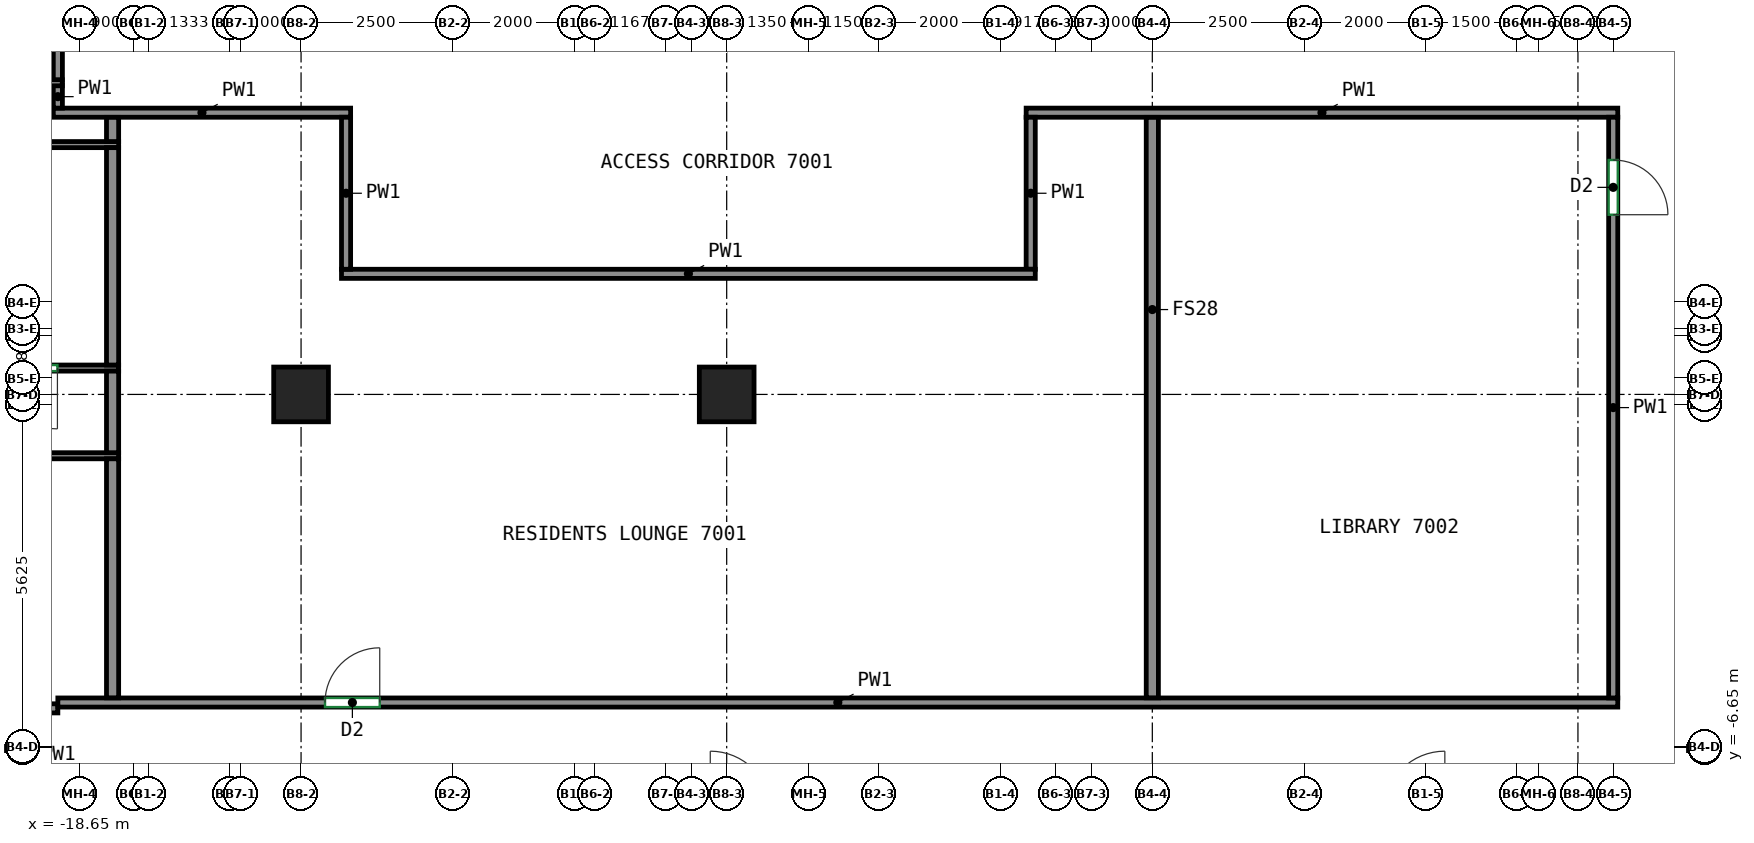
"""IFC4 building model, lengths in metres.
Left out: names, types, materials, properties, quantities, classifications, styles, units other than length and angle.
Written with IfcOpenShell. Run it as: python <this file> out.ifc"""

import sys

from ifc_helpers import new_model, si_unit, direction, frame, frame_2d, origin, origin_2d, place, context, subcontext, project, spatial, rectangle, extrude, source, transform, mapped, element, fill, save


model = new_model("IFC4")
c1 = context("Model", 3, precision=1e-05, world=origin(), true_north=direction((0.0, 1.0)))
c2 = subcontext(c1, "Body", "Model", "MODEL_VIEW")
j1 = project(units=[si_unit("LENGTHUNIT", "METRE"), si_unit("PLANEANGLEUNIT", "RADIAN")], contexts=[c1])
p1 = place(None, origin())
s1 = spatial("IfcSite", under=j1, at=p1, CompositionType="ELEMENT")
p2 = place(p1, origin())
s2 = spatial("IfcBuilding", under=s1, at=p2, CompositionType="ELEMENT")
p3 = place(p2, frame((0.0, 0.0, 284.0)))
s3 = spatial("IfcBuildingStorey", under=s2, at=p3, CompositionType="ELEMENT", Elevation=284.0)
m1 = source(origin(), c2, "Body", "SweptSolid", [
    extrude(rectangle(XDim=0.9, YDim=0.9, at=origin_2d()), origin(), (0.0, 0.0, 1.0), 3.12),
])
for number, where, z_axis, x_axis in (
    (1, (-15.0, -0.833, 0.0), (0.0, 0.0, 1.0), (1.0, 0.0, 0.0)),
    (2, (-8.0, -0.833, 0.0), (0.0, 0.0, 1.0), (1.0, 0.0, 0.0)),
):
    element("IfcColumn", number, at=place(p3, frame(where, z_axis=z_axis, x_axis=x_axis)), inside=s3, PredefinedType="COLUMN", context=c2, shape_type="MappedRepresentation", body=[
        mapped(m1, transform((0.0, 0.0, 0.0))),
    ])
p4 = place(p3, frame((-19.0, -5.996, 0.0), z_axis=(0.0, 0.0, 1.0), x_axis=(-1.0, 0.0, 0.0)))
e3 = element("IfcWall", 3, at=p4, inside=s3, PredefinedType="PARTITIONING", context=c2, shape_type="SweptSolid", body=[
    extrude(rectangle(XDim=0.677, YDim=0.15, at=frame_2d((0.338, 0.0))), origin(), (0.0, 0.0, 1.0), 3.12),
])
p5 = place(p3, frame((-19.0, -5.9, 0.0), z_axis=(0.0, 0.0, 1.0), x_axis=(1.0, 0.0, 0.0)))
e4 = element("IfcWall", 4, at=p5, inside=s3, PredefinedType="PARTITIONING", context=c2, shape_type="SweptSolid", body=[
    extrude(rectangle(XDim=25.655, YDim=0.15, at=frame_2d((12.828, 0.0))), origin(), (0.0, 0.0, 1.0), 3.12),
])
p6 = place(p5, frame((4.394, 0.0, 0.0)))
e5 = element("IfcOpeningElement", 5, at=p6, cuts=e4, PredefinedType="OPENING", context=c2, shape_type="SweptSolid", body=[
    extrude(rectangle(XDim=0.9, YDim=2.1, at=frame_2d((0.45, 1.05))), frame((0.0, 0.085, 0.0), z_axis=(0.0, -1.0, 0.0), x_axis=(1.0, 0.0, 0.0)), (0.0, 0.0, 1.0), 0.17),
])
p7 = place(p3, frame((-19.075, 3.8, 0.0), z_axis=(0.0, 0.0, 1.0), x_axis=(1.0, 0.0, 0.0)))
e6 = element("IfcWall", 6, at=p7, inside=s3, PredefinedType="PARTITIONING", context=c2, shape_type="SweptSolid", body=[
    extrude(rectangle(XDim=4.89, YDim=0.15, at=frame_2d((2.445, 0.0))), origin(), (0.0, 0.0, 1.0), 3.12),
])
p8 = place(p3, frame((-19.0, 3.875, 0.0), z_axis=(0.0, 0.0, 1.0), x_axis=(0.0, 1.0, 0.0)))
e7 = element("IfcWall", 7, at=p8, inside=s3, PredefinedType="PARTITIONING", context=c2, shape_type="SweptSolid", body=[
    extrude(rectangle(XDim=0.377, YDim=0.15, at=frame_2d((0.188, 0.0))), origin(), (0.0, 0.0, 1.0), 3.12),
])
p9 = place(p3, frame((-19.0, 4.332, 0.0), z_axis=(0.0, 0.0, 1.0), x_axis=(0.0, 1.0, 0.0)))
e8 = element("IfcWall", 8, at=p9, inside=s3, PredefinedType="PARTITIONING", context=c2, shape_type="SweptSolid", body=[
    extrude(rectangle(XDim=3.578, YDim=0.15, at=frame_2d((1.789, 0.0))), origin(), (0.0, 0.0, 1.0), 3.12),
])
p10 = place(p3, frame((-3.075, 3.8, 0.0), z_axis=(0.0, 0.0, 1.0), x_axis=(1.0, 0.0, 0.0)))
e9 = element("IfcWall", 9, at=p10, inside=s3, PredefinedType="PARTITIONING", context=c2, shape_type="SweptSolid", body=[
    extrude(rectangle(XDim=9.73, YDim=0.15, at=frame_2d((4.865, 0.0))), origin(), (0.0, 0.0, 1.0), 3.12),
])
p11 = place(p3, frame((-3.0, 1.225, 0.0), z_axis=(0.0, 0.0, 1.0), x_axis=(0.0, 1.0, 0.0)))
e10 = element("IfcWall", 10, at=p11, inside=s3, PredefinedType="PARTITIONING", context=c2, shape_type="SweptSolid", body=[
    extrude(rectangle(XDim=2.5, YDim=0.15, at=frame_2d((1.25, 0.0))), origin(), (0.0, 0.0, 1.0), 3.12),
])
p12 = place(p3, frame((-14.335, 1.15, 0.0), z_axis=(0.0, 0.0, 1.0), x_axis=(1.0, 0.0, 0.0)))
e11 = element("IfcWall", 11, at=p12, inside=s3, PredefinedType="PARTITIONING", context=c2, shape_type="SweptSolid", body=[
    extrude(rectangle(XDim=11.41, YDim=0.15, at=frame_2d((5.705, 0.0))), origin(), (0.0, 0.0, 1.0), 3.12),
])
p13 = place(p3, frame((-14.26, 3.725, 0.0), z_axis=(0.0, 0.0, 1.0), x_axis=(0.0, -1.0, 0.0)))
e12 = element("IfcWall", 12, at=p13, inside=s3, PredefinedType="PARTITIONING", context=c2, shape_type="SweptSolid", body=[
    extrude(rectangle(XDim=2.5, YDim=0.15, at=frame_2d((1.25, 0.0))), origin(), (0.0, 0.0, 1.0), 3.12),
])
p14 = place(p3, frame((6.58, 3.725, 0.0), z_axis=(0.0, 0.0, 1.0), x_axis=(0.0, -1.0, 0.0)))
e13 = element("IfcWall", 13, at=p14, inside=s3, PredefinedType="PARTITIONING", context=c2, shape_type="SweptSolid", body=[
    extrude(rectangle(XDim=9.55, YDim=0.15, at=frame_2d((4.775, 0.0))), origin(), (0.0, 0.0, 1.0), 3.12),
])
p15 = place(p14, frame((0.703, 0.0, 0.0)))
e14 = element("IfcOpeningElement", 14, at=p15, cuts=e13, PredefinedType="OPENING", context=c2, shape_type="SweptSolid", body=[
    extrude(rectangle(XDim=0.9, YDim=2.1, at=frame_2d((0.45, 1.05))), frame((0.0, 0.085, 0.0), z_axis=(0.0, -1.0, 0.0), x_axis=(1.0, 0.0, 0.0)), (0.0, 0.0, 1.0), 0.17),
])
p16 = place(p3, frame((-18.0, -1.842, 0.0), z_axis=(0.0, 0.0, 1.0), x_axis=(-1.0, 0.0, 0.0)))
e15 = element("IfcWall", 15, at=p16, inside=s3, PredefinedType="PARTITIONING", context=c2, shape_type="SweptSolid", body=[
    extrude(rectangle(XDim=7.25, YDim=0.1, at=frame_2d((3.625, 0.0))), origin(), (0.0, 0.0, 1.0), 3.12),
])
p17 = place(p16, frame((4.133, 0.0, 0.0)))
e16 = element("IfcOpeningElement", 16, at=p17, cuts=e15, PredefinedType="OPENING", context=c2, shape_type="SweptSolid", body=[
    extrude(rectangle(XDim=0.9, YDim=2.1, at=frame_2d((0.45, 1.05))), frame((0.0, 0.06, 0.0), z_axis=(0.0, -1.0, 0.0), x_axis=(1.0, 0.0, 0.0)), (0.0, 0.0, 1.0), 0.12),
])
p18 = place(p3, frame((-18.1, -5.823, 0.0), z_axis=(0.0, 0.0, 1.0), x_axis=(0.0, 1.0, 0.0)))
e17 = element("IfcWall", 17, at=p18, inside=s3, PredefinedType="PARTITIONING", context=c2, shape_type="SweptSolid", body=[
    extrude(rectangle(XDim=3.931, YDim=0.2, at=frame_2d((1.965, 0.0))), origin(), (0.0, 0.0, 1.0), 3.12),
])
p19 = place(p3, frame((-18.0, -0.4, 0.0), z_axis=(0.0, 0.0, 1.0), x_axis=(-1.0, 0.0, 0.0)))
e18 = element("IfcWall", 18, at=p19, inside=s3, PredefinedType="PARTITIONING", context=c2, shape_type="SweptSolid", body=[
    extrude(rectangle(XDim=7.25, YDim=0.1, at=frame_2d((3.625, 0.0))), origin(), (0.0, 0.0, 1.0), 3.12),
])
p20 = place(p19, frame((1.007, 0.0, 0.0)))
e19 = element("IfcOpeningElement", 19, at=p20, cuts=e18, PredefinedType="OPENING", context=c2, shape_type="SweptSolid", body=[
    extrude(rectangle(XDim=1.0, YDim=2.1, at=frame_2d((0.5, 1.05))), frame((0.0, 0.06, 0.0), z_axis=(0.0, -1.0, 0.0), x_axis=(1.0, 0.0, 0.0)), (0.0, 0.0, 1.0), 0.12),
])
p21 = place(p3, frame((-18.1, -1.792, 0.0), z_axis=(0.0, 0.0, 1.0), x_axis=(0.0, 1.0, 0.0)))
e20 = element("IfcWall", 20, at=p21, inside=s3, PredefinedType="PARTITIONING", context=c2, shape_type="SweptSolid", body=[
    extrude(rectangle(XDim=1.342, YDim=0.2, at=frame_2d((0.671, 0.0))), origin(), (0.0, 0.0, 1.0), 3.12),
])
p22 = place(p3, frame((-18.0, 3.275, 0.0), z_axis=(0.0, 0.0, 1.0), x_axis=(-1.0, 0.0, 0.0)))
e21 = element("IfcWall", 21, at=p22, inside=s3, PredefinedType="PARTITIONING", context=c2, shape_type="SweptSolid", body=[
    extrude(rectangle(XDim=7.25, YDim=0.1, at=frame_2d((3.625, 0.0))), origin(), (0.0, 0.0, 1.0), 3.12),
])
p23 = place(p22, frame((6.049, 0.0, 0.0)))
e22 = element("IfcOpeningElement", 22, at=p23, cuts=e21, PredefinedType="OPENING", context=c2, shape_type="SweptSolid", body=[
    extrude(rectangle(XDim=0.9, YDim=2.1, at=frame_2d((0.45, 1.05))), frame((0.0, 0.06, 0.0), z_axis=(0.0, -1.0, 0.0), x_axis=(1.0, 0.0, 0.0)), (0.0, 0.0, 1.0), 0.12),
])
p24 = place(p3, frame((-18.1, -0.35, 0.0), z_axis=(0.0, 0.0, 1.0), x_axis=(0.0, 1.0, 0.0)))
e23 = element("IfcWall", 23, at=p24, inside=s3, PredefinedType="PARTITIONING", context=c2, shape_type="SweptSolid", body=[
    extrude(rectangle(XDim=3.575, YDim=0.2, at=frame_2d((1.788, 0.0))), origin(), (0.0, 0.0, 1.0), 3.12),
])
p25 = place(p3, frame((-18.927, 4.292, 0.0), z_axis=(0.0, 0.0, 1.0), x_axis=(-1.0, 0.0, 0.0)))
e24 = element("IfcWall", 24, at=p25, inside=s3, PredefinedType="PARTITIONING", context=c2, shape_type="SweptSolid", body=[
    extrude(rectangle(XDim=6.323, YDim=0.1, at=frame_2d((3.162, 0.0))), origin(), (0.0, 0.0, 1.0), 3.12),
])
p26 = place(p25, frame((2.712, 0.0, 0.0)))
e25 = element("IfcOpeningElement", 25, at=p26, cuts=e24, PredefinedType="OPENING", context=c2, shape_type="SweptSolid", body=[
    extrude(rectangle(XDim=0.9, YDim=2.1, at=frame_2d((0.45, 1.05))), frame((0.0, 0.06, 0.0), z_axis=(0.0, -1.0, 0.0), x_axis=(1.0, 0.0, 0.0)), (0.0, 0.0, 1.0), 0.12),
])
p27 = place(p3, frame((-18.1, 3.325, 0.0), z_axis=(0.0, 0.0, 1.0), x_axis=(0.0, 1.0, 0.0)))
e26 = element("IfcWall", 26, at=p27, inside=s3, PredefinedType="PARTITIONING", context=c2, shape_type="SweptSolid", body=[
    extrude(rectangle(XDim=0.398, YDim=0.2, at=frame_2d((0.199, 0.0))), origin(), (0.0, 0.0, 1.0), 3.12),
])
p28 = place(p3, frame((-1.0, -5.823, 0.0), z_axis=(0.0, 0.0, 1.0), x_axis=(0.0, 1.0, 0.0)))
e27 = element("IfcWall", 27, at=p28, inside=s3, PredefinedType="PARTITIONING", context=c2, shape_type="SweptSolid", body=[
    extrude(rectangle(XDim=9.546, YDim=0.2, at=frame_2d((4.773, 0.0))), origin(), (0.0, 0.0, 1.0), 3.12),
])
p29 = place(p6, origin())
e28 = element("IfcDoor", 28, at=p29, inside=s3, OperationType="SINGLE_SWING_RIGHT", PredefinedType="DOOR", context=c2, shape_type="SweptSolid", body=[
    extrude(rectangle(XDim=0.9, YDim=2.1, at=frame_2d((0.45, 1.05))), frame((0.0, 0.025, 0.0), z_axis=(0.0, -1.0, 0.0), x_axis=(1.0, 0.0, 0.0)), (0.0, 0.0, 1.0), 0.05),
])
fill(e5, e28)
p30 = place(p20, origin())
e29 = element("IfcDoor", 29, at=p30, inside=s3, OperationType="SINGLE_SWING_LEFT", PredefinedType="DOOR", context=c2, shape_type="SweptSolid", body=[
    extrude(rectangle(XDim=1.0, YDim=2.1, at=frame_2d((0.5, 1.05))), frame((0.0, 0.025, 0.0), z_axis=(0.0, -1.0, 0.0), x_axis=(1.0, 0.0, 0.0)), (0.0, 0.0, 1.0), 0.05),
])
fill(e19, e29)
p31 = place(p15, origin())
e30 = element("IfcDoor", 30, at=p31, inside=s3, OperationType="SINGLE_SWING_RIGHT", PredefinedType="DOOR", context=c2, shape_type="SweptSolid", body=[
    extrude(rectangle(XDim=0.9, YDim=2.1, at=frame_2d((0.45, 1.05))), frame((0.0, 0.025, 0.0), z_axis=(0.0, -1.0, 0.0), x_axis=(1.0, 0.0, 0.0)), (0.0, 0.0, 1.0), 0.05),
])
fill(e14, e30)
save(model, sys.argv[1])
